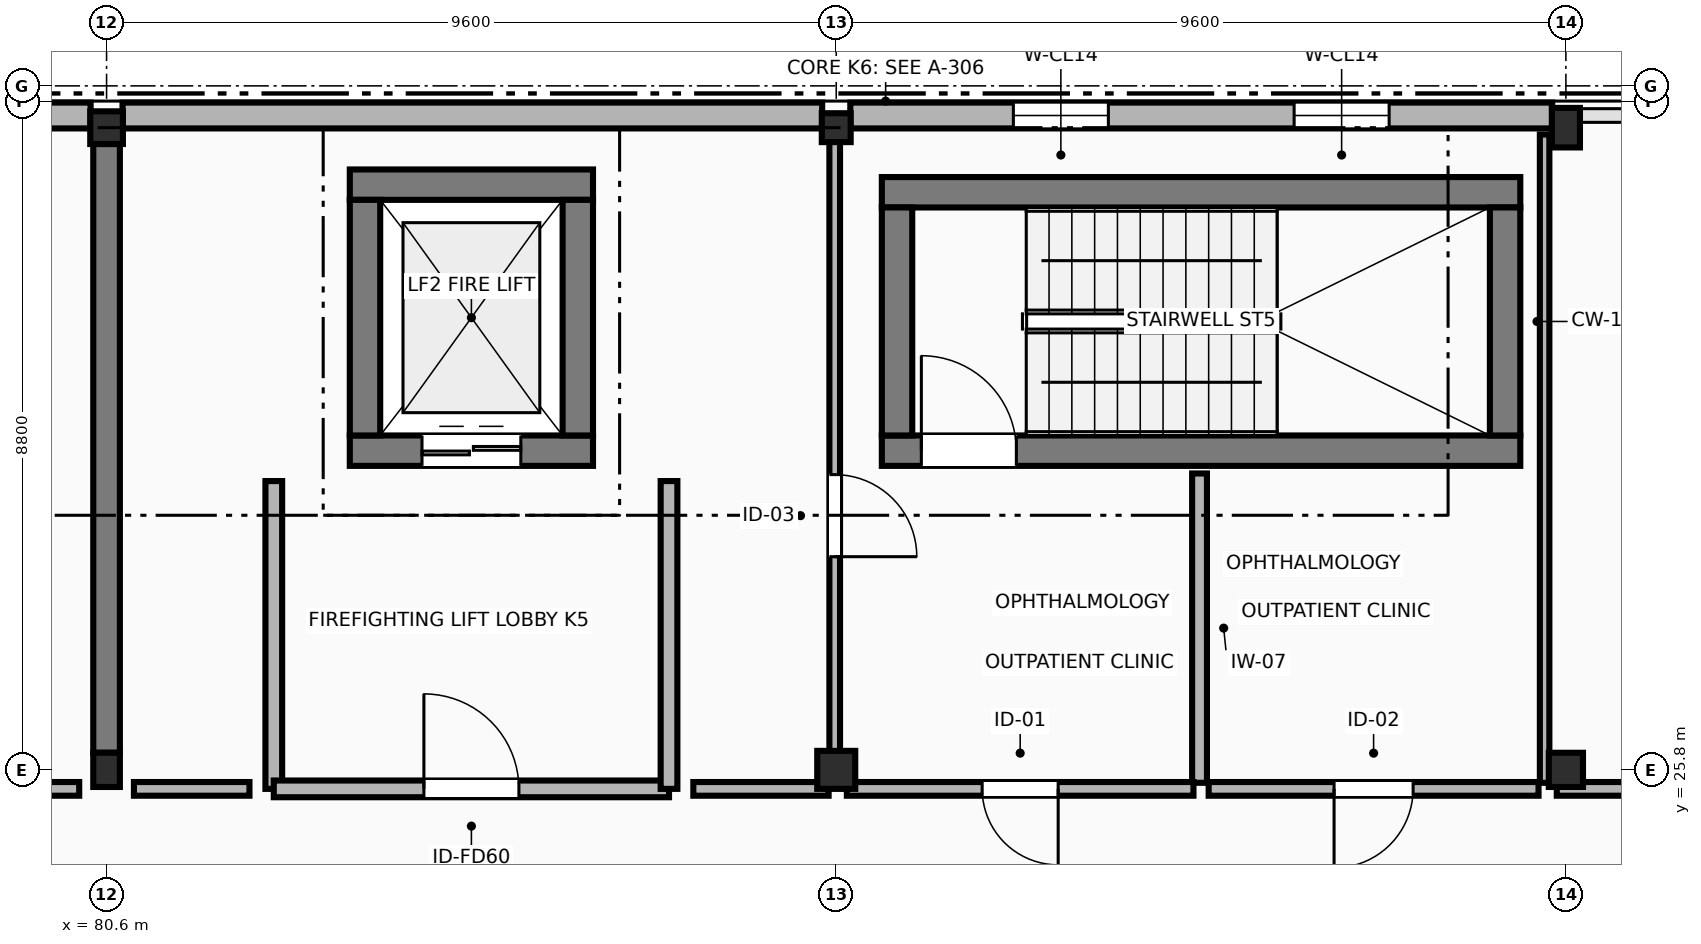
"""IFC4 building model, lengths in metres.
Left out: names, types, materials, properties, quantities, classifications, styles, units other than length and angle.
Written with IfcOpenShell. Run it as: python <this file> out.ifc"""

import sys

from ifc_helpers import new_model, si_unit, direction, frame, frame_2d, origin, origin_2d, place, context, subcontext, project, spatial, rectangle, extrude, element, fill, save


model = new_model("IFC4")
c1 = context("Model", 3, precision=1e-05, world=origin(), true_north=direction((0.0, 1.0)))
c2 = subcontext(c1, "Body", "Model", "MODEL_VIEW")
j1 = project(units=[si_unit("LENGTHUNIT", "METRE"), si_unit("PLANEANGLEUNIT", "RADIAN")], contexts=[c1])
p1 = place(None, origin())
s1 = spatial("IfcSite", under=j1, at=p1, CompositionType="ELEMENT")
p2 = place(p1, origin())
s2 = spatial("IfcBuilding", under=s1, at=p2, CompositionType="ELEMENT")
p3 = place(p2, frame((0.0, 0.0, 13.8)))
s3 = spatial("IfcBuildingStorey", under=s2, at=p3, CompositionType="ELEMENT", Elevation=13.8)
p4 = place(p3, frame((80.6, 25.8, 0.0), z_axis=(0.0, 0.0, 1.0), x_axis=(1.0, 0.0, 0.0)))
e1 = element("IfcColumn", 1, at=p4, inside=s3, PredefinedType="COLUMN", context=c2, shape_type="SweptSolid", body=[
    extrude(rectangle(XDim=0.35, YDim=0.45, at=origin_2d()), origin(), (0.0, 0.0, 1.0), 4.2),
])
p5 = place(p3, frame((80.6, 34.25, 0.0), z_axis=(0.0, 0.0, 1.0), x_axis=(1.0, 0.0, 0.0)))
e2 = element("IfcColumn", 2, at=p5, inside=s3, PredefinedType="COLUMN", context=c2, shape_type="SweptSolid", body=[
    extrude(rectangle(XDim=0.43, YDim=0.43, at=origin_2d()), origin(), (0.0, 0.0, 1.0), 4.2),
])
p6 = place(p3, frame((90.2, 25.8, 0.0), z_axis=(0.0, 0.0, 1.0), x_axis=(1.0, 0.0, 0.0)))
e3 = element("IfcColumn", 3, at=p6, inside=s3, PredefinedType="COLUMN", context=c2, shape_type="SweptSolid", body=[
    extrude(rectangle(XDim=0.5, YDim=0.5, at=origin_2d()), origin(), (0.0, 0.0, 1.0), 4.2),
])
p7 = place(p3, frame((90.2, 34.25, 0.0), z_axis=(0.0, 0.0, 1.0), x_axis=(1.0, 0.0, 0.0)))
e4 = element("IfcColumn", 4, at=p7, inside=s3, PredefinedType="COLUMN", context=c2, shape_type="SweptSolid", body=[
    extrude(rectangle(XDim=0.38, YDim=0.38, at=origin_2d()), origin(), (0.0, 0.0, 1.0), 4.2),
])
p8 = place(p3, frame((99.8, 25.8, 0.0), z_axis=(0.0, 0.0, 1.0), x_axis=(1.0, 0.0, 0.0)))
e5 = element("IfcColumn", 5, at=p8, inside=s3, PredefinedType="COLUMN", context=c2, shape_type="SweptSolid", body=[
    extrude(rectangle(XDim=0.45, YDim=0.45, at=origin_2d()), origin(), (0.0, 0.0, 1.0), 4.2),
])
p9 = place(p3, frame((99.8, 34.25, 0.0), z_axis=(0.0, 0.0, 1.0), x_axis=(1.0, 0.0, 0.0)))
e6 = element("IfcColumn", 6, at=p9, inside=s3, PredefinedType="COLUMN", context=c2, shape_type="SweptSolid", body=[
    extrude(rectangle(XDim=0.37, YDim=0.52, at=origin_2d()), origin(), (0.0, 0.0, 1.0), 4.2),
])
p10 = place(p3, frame((99.62, 34.41, 0.0), z_axis=(0.0, 0.0, 1.0), x_axis=(-1.0, 0.0, 0.0)))
e7 = element("IfcWall", 7, at=p10, inside=s3, PredefinedType="STANDARD", context=c2, shape_type="SweptSolid", body=[
    extrude(rectangle(XDim=9.235, YDim=0.34, at=frame_2d((4.618, 0.0))), origin(), (0.0, 0.0, 1.0), 3.185),
])
p11 = place(p10, frame((2.146, 0.0, 0.95)))
e8 = element("IfcOpeningElement", 8, at=p11, cuts=e7, PredefinedType="OPENING", context=c2, shape_type="SweptSolid", body=[
    extrude(rectangle(XDim=1.25, YDim=1.55, at=frame_2d((0.625, 0.775))), frame((0.0, 0.18, 0.0), z_axis=(0.0, -1.0, 0.0), x_axis=(1.0, 0.0, 0.0)), (0.0, 0.0, 1.0), 0.36),
])
p12 = place(p10, frame((5.84, 0.0, 0.95)))
e9 = element("IfcOpeningElement", 9, at=p12, cuts=e7, PredefinedType="OPENING", context=c2, shape_type="SweptSolid", body=[
    extrude(rectangle(XDim=1.25, YDim=1.55, at=frame_2d((0.625, 0.775))), frame((0.0, 0.18, 0.0), z_axis=(0.0, -1.0, 0.0), x_axis=(1.0, 0.0, 0.0)), (0.0, 0.0, 1.0), 0.36),
])
p13 = place(p3, frame((90.015, 34.41, 0.0), z_axis=(0.0, 0.0, 1.0), x_axis=(-1.0, 0.0, 0.0)))
e10 = element("IfcWall", 10, at=p13, inside=s3, PredefinedType="STANDARD", context=c2, shape_type="SweptSolid", body=[
    extrude(rectangle(XDim=9.205, YDim=0.34, at=frame_2d((4.603, 0.0))), origin(), (0.0, 0.0, 1.0), 3.185),
])
p14 = place(p3, frame((80.39, 34.41, 0.0), z_axis=(0.0, 0.0, 1.0), x_axis=(-1.0, 0.0, 0.0)))
e11 = element("IfcWall", 11, at=p14, inside=s3, PredefinedType="STANDARD", context=c2, shape_type="SweptSolid", body=[
    extrude(rectangle(XDim=9.155, YDim=0.34, at=frame_2d((4.577, 0.0))), origin(), (0.0, 0.0, 1.0), 3.185),
])
p15 = place(p3, frame((90.8, 30.0, 0.0), z_axis=(0.0, 0.0, 1.0), x_axis=(1.0, 0.0, 0.0)))
e12 = element("IfcWall", 12, at=p15, inside=s3, PredefinedType="SHEAR", context=c2, shape_type="SweptSolid", body=[
    extrude(rectangle(XDim=8.4, YDim=0.4, at=frame_2d((4.2, 0.0))), origin(), (0.0, 0.0, 1.0), 3.92),
])
p16 = place(p15, frame((0.52, 0.0, 0.0)))
e13 = element("IfcOpeningElement", 13, at=p16, cuts=e12, PredefinedType="OPENING", context=c2, shape_type="SweptSolid", body=[
    extrude(rectangle(XDim=1.25, YDim=2.2, at=frame_2d((0.625, 1.1))), frame((0.0, 0.21, 0.0), z_axis=(0.0, -1.0, 0.0), x_axis=(1.0, 0.0, 0.0)), (0.0, 0.0, 1.0), 0.42),
])
p17 = place(p3, frame((99.2, 33.4, 0.0), z_axis=(0.0, 0.0, 1.0), x_axis=(-1.0, 0.0, 0.0)))
e14 = element("IfcWall", 14, at=p17, inside=s3, PredefinedType="SHEAR", context=c2, shape_type="SweptSolid", body=[
    extrude(rectangle(XDim=8.4, YDim=0.4, at=frame_2d((4.2, 0.0))), origin(), (0.0, 0.0, 1.0), 3.92),
])
for number, where, z_axis, x_axis in (
    (15, (91.0, 30.2, 0.0), (0.0, 0.0, 1.0), (0.0, 1.0, 0.0)),
    (16, (99.0, 33.2, 0.0), (0.0, 0.0, 1.0), (0.0, -1.0, 0.0)),
):
    element("IfcWall", number, at=place(p3, frame(where, z_axis=z_axis, x_axis=x_axis)), inside=s3, PredefinedType="SHEAR", context=c2, shape_type="SweptSolid", body=[
        extrude(rectangle(XDim=3.0, YDim=0.4, at=frame_2d((1.5, 0.0))), origin(), (0.0, 0.0, 1.0), 3.92),
    ])
p18 = place(p3, frame((83.8, 30.0, 0.0), z_axis=(0.0, 0.0, 1.0), x_axis=(1.0, 0.0, 0.0)))
e17 = element("IfcWall", 17, at=p18, inside=s3, PredefinedType="SHEAR", context=c2, shape_type="SweptSolid", body=[
    extrude(rectangle(XDim=3.2, YDim=0.4, at=frame_2d((1.6, 0.0))), origin(), (0.0, 0.0, 1.0), 4.2),
])
p19 = place(p18, frame((0.95, 0.0, 0.0)))
e18 = element("IfcOpeningElement", 18, at=p19, cuts=e17, PredefinedType="OPENING", context=c2, shape_type="SweptSolid", body=[
    extrude(rectangle(XDim=1.3, YDim=2.25, at=frame_2d((0.65, 1.125))), frame((0.0, 0.21, 0.0), z_axis=(0.0, -1.0, 0.0), x_axis=(1.0, 0.0, 0.0)), (0.0, 0.0, 1.0), 0.42),
])
p20 = place(p3, frame((87.0, 33.5, 0.0), z_axis=(0.0, 0.0, 1.0), x_axis=(-1.0, 0.0, 0.0)))
e19 = element("IfcWall", 19, at=p20, inside=s3, PredefinedType="SHEAR", context=c2, shape_type="SweptSolid", body=[
    extrude(rectangle(XDim=3.2, YDim=0.4, at=frame_2d((1.6, 0.0))), origin(), (0.0, 0.0, 1.0), 4.2),
])
for number, where, z_axis, x_axis in (
    (20, (84.0, 30.2, 0.0), (0.0, 0.0, 1.0), (0.0, 1.0, 0.0)),
    (21, (86.8, 33.3, 0.0), (0.0, 0.0, 1.0), (0.0, -1.0, 0.0)),
):
    element("IfcWall", number, at=place(p3, frame(where, z_axis=z_axis, x_axis=x_axis)), inside=s3, PredefinedType="SHEAR", context=c2, shape_type="SweptSolid", body=[
        extrude(rectangle(XDim=3.1, YDim=0.4, at=frame_2d((1.55, 0.0))), origin(), (0.0, 0.0, 1.0), 4.2),
    ])
p21 = place(p3, frame((82.8, 29.6, 0.0), z_axis=(0.0, 0.0, 1.0), x_axis=(0.0, -1.0, 0.0)))
e22 = element("IfcWall", 22, at=p21, inside=s3, PredefinedType="PARTITIONING", context=c2, shape_type="SweptSolid", body=[
    extrude(rectangle(XDim=4.05, YDim=0.22, at=frame_2d((2.025, 0.0))), origin(), (0.0, 0.0, 1.0), 3.92),
])
p22 = place(p3, frame((82.8, 25.55, 0.0), z_axis=(0.0, 0.0, 1.0), x_axis=(1.0, 0.0, 0.0)))
e23 = element("IfcWall", 23, at=p22, inside=s3, PredefinedType="PARTITIONING", context=c2, shape_type="SweptSolid", body=[
    extrude(rectangle(XDim=5.2, YDim=0.22, at=frame_2d((2.6, 0.0))), origin(), (0.0, 0.0, 1.0), 3.225),
])
p23 = place(p22, frame((1.975, 0.0, 0.0)))
e24 = element("IfcOpeningElement", 24, at=p23, cuts=e23, PredefinedType="OPENING", context=c2, shape_type="SweptSolid", body=[
    extrude(rectangle(XDim=1.25, YDim=2.2, at=frame_2d((0.625, 1.1))), frame((0.0, 0.12, 0.0), z_axis=(0.0, -1.0, 0.0), x_axis=(1.0, 0.0, 0.0)), (0.0, 0.0, 1.0), 0.24),
])
p24 = place(p3, frame((88.0, 25.55, 0.0), z_axis=(0.0, 0.0, 1.0), x_axis=(0.0, 1.0, 0.0)))
e25 = element("IfcWall", 25, at=p24, inside=s3, PredefinedType="PARTITIONING", context=c2, shape_type="SweptSolid", body=[
    extrude(rectangle(XDim=4.05, YDim=0.22, at=frame_2d((2.025, 0.0))), origin(), (0.0, 0.0, 1.0), 3.92),
])
p25 = place(p3, frame((80.6, 26.025, 0.0), z_axis=(0.0, 0.0, 1.0), x_axis=(0.0, 1.0, 0.0)))
e26 = element("IfcWall", 26, at=p25, inside=s3, PredefinedType="SHEAR", context=c2, shape_type="SweptSolid", body=[
    extrude(rectangle(XDim=8.01, YDim=0.35, at=frame_2d((4.005, 0.0))), origin(), (0.0, 0.0, 1.0), 3.92),
])
p26 = place(p3, frame((80.24, 25.55, 0.0), z_axis=(0.0, 0.0, 1.0), x_axis=(-1.0, 0.0, 0.0)))
e27 = element("IfcWall", 27, at=p26, inside=s3, PredefinedType="PARTITIONING", context=c2, shape_type="SweptSolid", body=[
    extrude(rectangle(XDim=2.12, YDim=0.18, at=frame_2d((1.06, 0.0))), origin(), (0.0, 0.0, 1.0), 3.225),
])
p27 = place(p26, frame((0.4, 0.0, 0.0)))
e28 = element("IfcOpeningElement", 28, at=p27, cuts=e27, PredefinedType="OPENING", context=c2, shape_type="SweptSolid", body=[
    extrude(rectangle(XDim=1.32, YDim=2.22, at=frame_2d((0.66, 1.11))), frame((0.0, 0.1, 0.0), z_axis=(0.0, -1.0, 0.0), x_axis=(1.0, 0.0, 0.0)), (0.0, 0.0, 1.0), 0.2),
])
p28 = place(p3, frame((82.48, 25.55, 0.0), z_axis=(0.0, 0.0, 1.0), x_axis=(-1.0, 0.0, 0.0)))
e29 = element("IfcWall", 29, at=p28, inside=s3, PredefinedType="PARTITIONING", context=c2, shape_type="SweptSolid", body=[
    extrude(rectangle(XDim=1.52, YDim=0.18, at=frame_2d((0.76, 0.0))), origin(), (0.0, 0.0, 1.0), 3.225),
])
p29 = place(p3, frame((90.18, 34.16, 0.0), z_axis=(0.0, 0.0, 1.0), x_axis=(0.0, -1.0, 0.0)))
e30 = element("IfcWall", 30, at=p29, inside=s3, PredefinedType="PARTITIONING", context=c2, shape_type="SweptSolid", body=[
    extrude(rectangle(XDim=8.53, YDim=0.14, at=frame_2d((4.265, 0.0))), origin(), (0.0, 0.0, 1.0), 3.365),
])
p30 = place(p29, frame((4.475, 0.0, 0.0)))
e31 = element("IfcOpeningElement", 31, at=p30, cuts=e30, PredefinedType="OPENING", context=c2, shape_type="SweptSolid", body=[
    extrude(rectangle(XDim=1.08, YDim=2.2, at=frame_2d((0.54, 1.1))), frame((0.0, 0.08, 0.0), z_axis=(0.0, -1.0, 0.0), x_axis=(1.0, 0.0, 0.0)), (0.0, 0.0, 1.0), 0.16),
])
p31 = place(p3, frame((90.1, 25.55, 0.0), z_axis=(0.0, 0.0, 1.0), x_axis=(-1.0, 0.0, 0.0)))
e32 = element("IfcWall", 32, at=p31, inside=s3, PredefinedType="PARTITIONING", context=c2, shape_type="SweptSolid", body=[
    extrude(rectangle(XDim=1.78, YDim=0.18, at=frame_2d((0.89, 0.0))), origin(), (0.0, 0.0, 1.0), 3.225),
])
p32 = place(p3, frame((94.98, 29.7, 0.0), z_axis=(0.0, 0.0, 1.0), x_axis=(0.0, -1.0, 0.0)))
e33 = element("IfcWall", 33, at=p32, inside=s3, PredefinedType="PARTITIONING", context=c2, shape_type="SweptSolid", body=[
    extrude(rectangle(XDim=4.07, YDim=0.195, at=frame_2d((2.035, 0.0))), origin(), (0.0, 0.0, 1.0), 3.92),
])
p33 = place(p3, frame((94.9, 25.55, 0.0), z_axis=(0.0, 0.0, 1.0), x_axis=(-1.0, 0.0, 0.0)))
e34 = element("IfcWall", 34, at=p33, inside=s3, PredefinedType="PARTITIONING", context=c2, shape_type="SweptSolid", body=[
    extrude(rectangle(XDim=4.56, YDim=0.18, at=frame_2d((2.28, 0.0))), origin(), (0.0, 0.0, 1.0), 3.225),
])
p34 = place(p33, frame((1.78, 0.0, 0.0)))
e35 = element("IfcOpeningElement", 35, at=p34, cuts=e34, PredefinedType="OPENING", context=c2, shape_type="SweptSolid", body=[
    extrude(rectangle(XDim=1.0, YDim=2.15, at=frame_2d((0.5, 1.075))), frame((0.0, 0.1, 0.0), z_axis=(0.0, -1.0, 0.0), x_axis=(1.0, 0.0, 0.0)), (0.0, 0.0, 1.0), 0.2),
])
p35 = place(p3, frame((99.52, 34.16, 0.0), z_axis=(0.0, 0.0, 1.0), x_axis=(0.0, -1.0, 0.0)))
e36 = element("IfcWall", 36, at=p35, inside=s3, PredefinedType="PARTITIONING", context=c2, shape_type="SweptSolid", body=[
    extrude(rectangle(XDim=8.53, YDim=0.125, at=frame_2d((4.265, 0.0))), origin(), (0.0, 0.0, 1.0), 2.965),
])
p36 = place(p3, frame((99.44, 25.55, 0.0), z_axis=(0.0, 0.0, 1.0), x_axis=(-1.0, 0.0, 0.0)))
e37 = element("IfcWall", 37, at=p36, inside=s3, PredefinedType="PARTITIONING", context=c2, shape_type="SweptSolid", body=[
    extrude(rectangle(XDim=4.34, YDim=0.18, at=frame_2d((2.17, 0.0))), origin(), (0.0, 0.0, 1.0), 3.225),
])
p37 = place(p36, frame((1.65, 0.0, 0.0)))
e38 = element("IfcOpeningElement", 38, at=p37, cuts=e37, PredefinedType="OPENING", context=c2, shape_type="SweptSolid", body=[
    extrude(rectangle(XDim=1.04, YDim=2.15, at=frame_2d((0.52, 1.075))), frame((0.0, 0.1, 0.0), z_axis=(0.0, -1.0, 0.0), x_axis=(1.0, 0.0, 0.0)), (0.0, 0.0, 1.0), 0.2),
])
p38 = place(p3, frame((108.78, 25.55, 0.0), z_axis=(0.0, 0.0, 1.0), x_axis=(-1.0, 0.0, 0.0)))
e39 = element("IfcWall", 39, at=p38, inside=s3, PredefinedType="PARTITIONING", context=c2, shape_type="SweptSolid", body=[
    extrude(rectangle(XDim=9.1, YDim=0.18, at=frame_2d((4.55, 0.0))), origin(), (0.0, 0.0, 1.0), 3.225),
])
p39 = place(p38, frame((4.07, 0.0, 0.0)))
e40 = element("IfcOpeningElement", 40, at=p39, cuts=e39, PredefinedType="OPENING", context=c2, shape_type="SweptSolid", body=[
    extrude(rectangle(XDim=0.96, YDim=2.1, at=frame_2d((0.48, 1.05))), frame((0.0, 0.1, 0.0), z_axis=(0.0, -1.0, 0.0), x_axis=(1.0, 0.0, 0.0)), (0.0, 0.0, 1.0), 0.2),
])
p40 = place(p11, origin())
e41 = element("IfcWindow", 41, at=p40, inside=s3, PartitioningType="SINGLE_PANEL", PredefinedType="WINDOW", context=c2, shape_type="SweptSolid", body=[
    extrude(rectangle(XDim=1.25, YDim=1.55, at=frame_2d((0.625, 0.775))), frame((0.0, 0.03, 0.0), z_axis=(0.0, -1.0, 0.0), x_axis=(1.0, 0.0, 0.0)), (0.0, 0.0, 1.0), 0.06),
])
fill(e8, e41)
p41 = place(p12, origin())
e42 = element("IfcWindow", 42, at=p41, inside=s3, PartitioningType="SINGLE_PANEL", PredefinedType="WINDOW", context=c2, shape_type="SweptSolid", body=[
    extrude(rectangle(XDim=1.25, YDim=1.55, at=frame_2d((0.625, 0.775))), frame((0.0, 0.03, 0.0), z_axis=(0.0, -1.0, 0.0), x_axis=(1.0, 0.0, 0.0)), (0.0, 0.0, 1.0), 0.06),
])
fill(e9, e42)
p42 = place(p16, origin())
e43 = element("IfcDoor", 43, at=p42, inside=s3, OperationType="SINGLE_SWING_LEFT", PredefinedType="DOOR", context=c2, shape_type="SweptSolid", body=[
    extrude(rectangle(XDim=1.25, YDim=2.2, at=frame_2d((0.625, 1.1))), frame((0.0, 0.025, 0.0), z_axis=(0.0, -1.0, 0.0), x_axis=(1.0, 0.0, 0.0)), (0.0, 0.0, 1.0), 0.05),
])
fill(e13, e43)
p43 = place(p19, origin())
e44 = element("IfcDoor", 44, at=p43, inside=s3, OperationType="DOUBLE_DOOR_SLIDING", PredefinedType="DOOR", context=c2, shape_type="SweptSolid", body=[
    extrude(rectangle(XDim=1.3, YDim=2.25, at=frame_2d((0.65, 1.125))), frame((0.0, 0.025, 0.0), z_axis=(0.0, -1.0, 0.0), x_axis=(1.0, 0.0, 0.0)), (0.0, 0.0, 1.0), 0.05),
])
fill(e18, e44)
p44 = place(p23, origin())
e45 = element("IfcDoor", 45, at=p44, inside=s3, OperationType="SINGLE_SWING_LEFT", PredefinedType="DOOR", context=c2, shape_type="SweptSolid", body=[
    extrude(rectangle(XDim=1.25, YDim=2.2, at=frame_2d((0.625, 1.1))), frame((0.0, 0.025, 0.0), z_axis=(0.0, -1.0, 0.0), x_axis=(1.0, 0.0, 0.0)), (0.0, 0.0, 1.0), 0.05),
])
fill(e24, e45)
p45 = place(p30, origin())
e46 = element("IfcDoor", 46, at=p45, inside=s3, OperationType="SINGLE_SWING_RIGHT", PredefinedType="DOOR", context=c2, shape_type="SweptSolid", body=[
    extrude(rectangle(XDim=1.08, YDim=2.2, at=frame_2d((0.54, 1.1))), frame((0.0, 0.025, 0.0), z_axis=(0.0, -1.0, 0.0), x_axis=(1.0, 0.0, 0.0)), (0.0, 0.0, 1.0), 0.05),
])
fill(e31, e46)
p46 = place(p34, origin())
e47 = element("IfcDoor", 47, at=p46, inside=s3, OperationType="SINGLE_SWING_LEFT", PredefinedType="DOOR", context=c2, shape_type="SweptSolid", body=[
    extrude(rectangle(XDim=1.0, YDim=2.15, at=frame_2d((0.5, 1.075))), frame((0.0, 0.025, 0.0), z_axis=(0.0, -1.0, 0.0), x_axis=(1.0, 0.0, 0.0)), (0.0, 0.0, 1.0), 0.05),
])
fill(e35, e47)
p47 = place(p37, origin())
e48 = element("IfcDoor", 48, at=p47, inside=s3, OperationType="SINGLE_SWING_RIGHT", PredefinedType="DOOR", context=c2, shape_type="SweptSolid", body=[
    extrude(rectangle(XDim=1.04, YDim=2.15, at=frame_2d((0.52, 1.075))), frame((0.0, 0.025, 0.0), z_axis=(0.0, -1.0, 0.0), x_axis=(1.0, 0.0, 0.0)), (0.0, 0.0, 1.0), 0.05),
])
fill(e38, e48)
save(model, sys.argv[1])
